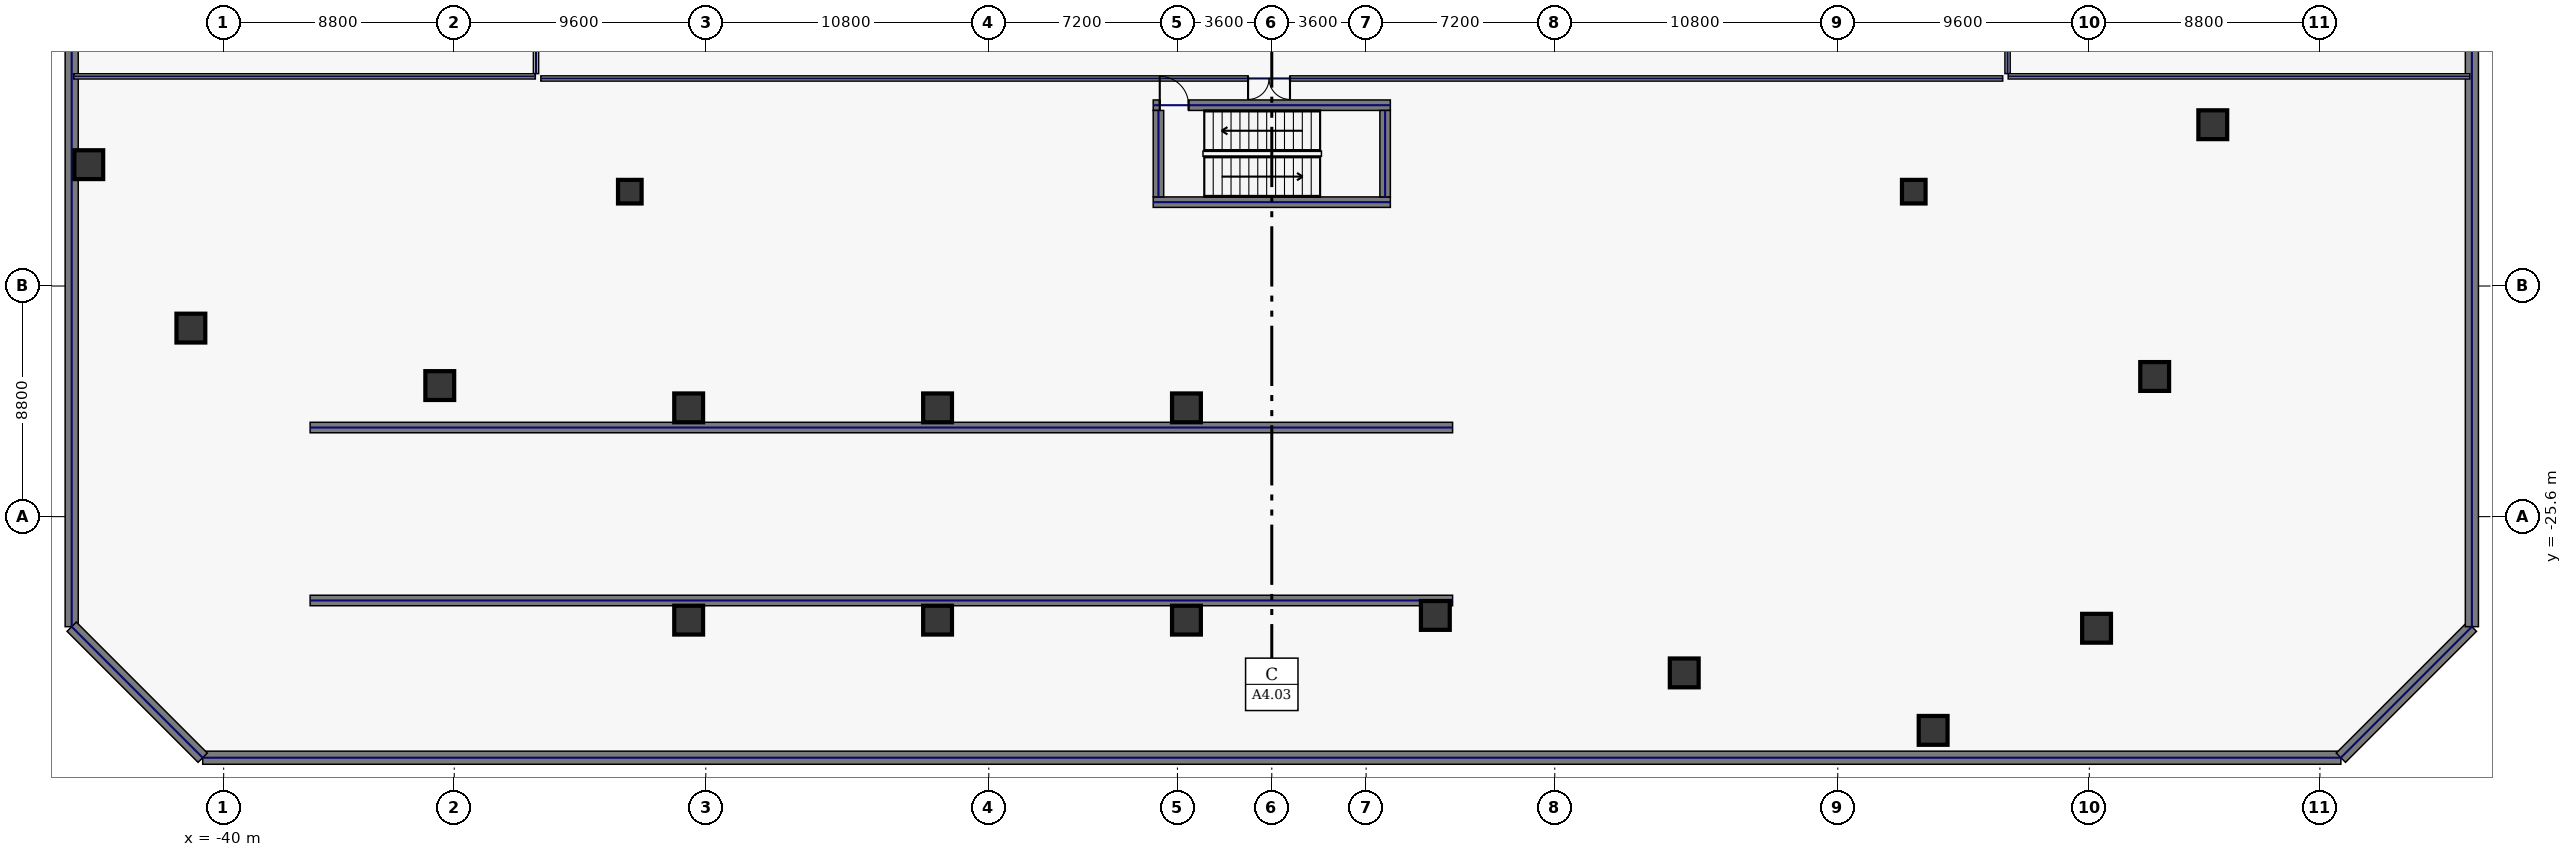
"""IFC4 building model, lengths in metres.
Left out: names, types, materials, properties, quantities, classifications, styles, units other than length and angle.
Written with IfcOpenShell. Run it as: python <this file> out.ifc"""

import sys

from ifc_helpers import new_model, si_unit, direction, frame, frame_2d, origin, origin_2d, place, context, subcontext, project, spatial, rectangle, extrude, element, fill, save


model = new_model("IFC4")
c1 = context("Model", 3, precision=1e-05, world=origin(), true_north=direction((0.0, 1.0)))
c2 = subcontext(c1, "Body", "Model", "MODEL_VIEW")
j1 = project(units=[si_unit("LENGTHUNIT", "METRE"), si_unit("PLANEANGLEUNIT", "RADIAN")], contexts=[c1])
p1 = place(None, origin())
s1 = spatial("IfcSite", under=j1, at=p1, CompositionType="ELEMENT")
p2 = place(p1, origin())
s2 = spatial("IfcBuilding", under=s1, at=p2, CompositionType="ELEMENT")
p3 = place(p2, frame((0.0, 0.0, -10.2)))
s3 = spatial("IfcBuildingStorey", under=s2, at=p3, CompositionType="ELEMENT", Elevation=-10.2)
p4 = place(p3, frame((-40.8, -34.8, 0.0), z_axis=(0.0, 0.0, 1.0), x_axis=(1.0, 0.0, 0.0)))
e1 = element("IfcWall", 1, at=p4, inside=s3, PredefinedType="SHEAR", context=c2, shape_type="SweptSolid", body=[
    extrude(rectangle(XDim=81.6, YDim=0.5, at=frame_2d((40.8, 0.0))), origin(), (0.0, 0.0, 1.0), 4.45),
])
p5 = place(p3, frame((40.8, -34.8, 0.0), z_axis=(0.0, 0.0, 1.0), x_axis=(0.707106781187, 0.707106781187, 0.0)))
e2 = element("IfcWall", 2, at=p5, inside=s3, PredefinedType="SHEAR", context=c2, shape_type="SweptSolid", body=[
    extrude(rectangle(XDim=7.071, YDim=0.5, at=frame_2d((3.536, 0.0))), origin(), (0.0, 0.0, 1.0), 4.45),
])
for number, where, z_axis, x_axis in (
    (3, (45.8, -29.8, 0.0), (0.0, 0.0, 1.0), (0.0, 1.0, 0.0)),
    (4, (-45.8, 26.4, 0.0), (0.0, 0.0, 1.0), (0.0, -1.0, 0.0)),
):
    element("IfcWall", number, at=place(p3, frame(where, z_axis=z_axis, x_axis=x_axis)), inside=s3, PredefinedType="SHEAR", context=c2, shape_type="SweptSolid", body=[
        extrude(rectangle(XDim=56.2, YDim=0.5, at=frame_2d((28.1, 0.0))), origin(), (0.0, 0.0, 1.0), 4.45),
    ])
p6 = place(p3, frame((-45.8, -29.8, 0.0), z_axis=(0.0, 0.0, 1.0), x_axis=(0.707106781187, -0.707106781187, 0.0)))
e5 = element("IfcWall", 5, at=p6, inside=s3, PredefinedType="SHEAR", context=c2, shape_type="SweptSolid", body=[
    extrude(rectangle(XDim=7.071, YDim=0.5, at=frame_2d((3.536, 0.0))), origin(), (0.0, 0.0, 1.0), 4.45),
])
for number, where, z_axis, x_axis in (
    (6, (-36.7, -28.8, 0.0), (0.0, 0.0, 1.0), (1.0, 0.0, 0.0)),
    (7, (-36.7, -22.2, 0.0), (0.0, 0.0, 1.0), (1.0, 0.0, 0.0)),
):
    element("IfcWall", number, at=place(p3, frame(where, z_axis=z_axis, x_axis=x_axis)), inside=s3, PredefinedType="SHEAR", context=c2, shape_type="SweptSolid", body=[
        extrude(rectangle(XDim=43.6, YDim=0.4, at=frame_2d((21.8, 0.0))), origin(), (0.0, 0.0, 1.0), 4.45),
    ])
p7 = place(p3, frame((-4.525, -13.6, 0.0), z_axis=(0.0, 0.0, 1.0), x_axis=(1.0, 0.0, 0.0)))
e8 = element("IfcWall", 8, at=p7, inside=s3, PredefinedType="SHEAR", context=c2, shape_type="SweptSolid", body=[
    extrude(rectangle(XDim=9.05, YDim=0.4, at=frame_2d((4.525, 0.0))), origin(), (0.0, 0.0, 1.0), 4.45),
])
p8 = place(p3, frame((-4.525, -9.9, 0.0), z_axis=(0.0, 0.0, 1.0), x_axis=(1.0, 0.0, 0.0)))
e9 = element("IfcWall", 9, at=p8, inside=s3, PredefinedType="SHEAR", context=c2, shape_type="SweptSolid", body=[
    extrude(rectangle(XDim=9.05, YDim=0.4, at=frame_2d((4.525, 0.0))), origin(), (0.0, 0.0, 1.0), 4.45),
])
p9 = place(p8, frame((0.25, 0.0, 0.0)))
e10 = element("IfcOpeningElement", 10, at=p9, cuts=e9, PredefinedType="OPENING", context=c2, shape_type="SweptSolid", body=[
    extrude(rectangle(XDim=1.1, YDim=2.2, at=frame_2d((0.55, 1.1))), frame((0.0, 0.21, 0.0), z_axis=(0.0, -1.0, 0.0), x_axis=(1.0, 0.0, 0.0)), (0.0, 0.0, 1.0), 0.42),
])
for number, where, z_axis, x_axis in (
    (11, (-4.325, -13.4, 0.0), (0.0, 0.0, 1.0), (0.0, 1.0, 0.0)),
    (12, (4.325, -13.4, 0.0), (0.0, 0.0, 1.0), (0.0, 1.0, 0.0)),
):
    element("IfcWall", number, at=place(p3, frame(where, z_axis=z_axis, x_axis=x_axis)), inside=s3, PredefinedType="SHEAR", context=c2, shape_type="SweptSolid", body=[
        extrude(rectangle(XDim=3.3, YDim=0.4, at=frame_2d((1.65, 0.0))), origin(), (0.0, 0.0, 1.0), 4.45),
    ])
for number, where, z_axis, x_axis in (
    (13, (-24.5, -13.2, 0.0), (0.0, 0.0, 1.0), (1.0, 0.0, 0.0)),
    (14, (24.5, -13.2, 0.0), (0.0, 0.0, 1.0), (1.0, 0.0, 0.0)),
):
    element("IfcColumn", number, at=place(p3, frame(where, z_axis=z_axis, x_axis=x_axis)), inside=s3, PredefinedType="COLUMN", context=c2, shape_type="SweptSolid", body=[
        extrude(rectangle(XDim=0.9, YDim=0.9, at=origin_2d()), origin(), (0.0, 0.0, 1.0), 4.45),
    ])
for number, where, z_axis, x_axis in (
    (15, (-41.251, -18.406, 0.0), (0.0, 0.0, 1.0), (1.0, 0.0, 0.0)),
    (16, (-31.752, -20.599, 0.0), (0.0, 0.0, 1.0), (1.0, 0.0, 0.0)),
    (17, (-22.254, -29.55, 0.0), (0.0, 0.0, 1.0), (1.0, 0.0, 0.0)),
    (18, (-22.254, -21.45, 0.0), (0.0, 0.0, 1.0), (1.0, 0.0, 0.0)),
    (19, (-12.755, -29.55, 0.0), (0.0, 0.0, 1.0), (1.0, 0.0, 0.0)),
    (20, (-12.755, -21.45, 0.0), (0.0, 0.0, 1.0), (1.0, 0.0, 0.0)),
    (21, (-3.256, -29.55, 0.0), (0.0, 0.0, 1.0), (1.0, 0.0, 0.0)),
    (22, (-3.256, -21.45, 0.0), (0.0, 0.0, 1.0), (1.0, 0.0, 0.0)),
    (23, (6.242, -29.371, 0.0), (0.0, 0.0, 1.0), (1.0, 0.0, 0.0)),
    (24, (15.741, -31.564, 0.0), (0.0, 0.0, 1.0), (1.0, 0.0, 0.0)),
    (25, (25.24, -33.757, 0.0), (0.0, 0.0, 1.0), (1.0, 0.0, 0.0)),
    (26, (31.476, -29.86, 0.0), (0.0, 0.0, 1.0), (1.0, 0.0, 0.0)),
    (27, (33.694, -20.252, 0.0), (0.0, 0.0, 1.0), (1.0, 0.0, 0.0)),
    (28, (35.912, -10.645, 0.0), (0.0, 0.0, 1.0), (1.0, 0.0, 0.0)),
    (29, (-45.148, -12.169, 0.0), (0.0, 0.0, 1.0), (1.0, 0.0, 0.0)),
):
    element("IfcColumn", number, at=place(p3, frame(where, z_axis=z_axis, x_axis=x_axis)), inside=s3, PredefinedType="COLUMN", context=c2, shape_type="SweptSolid", body=[
        extrude(rectangle(XDim=1.1, YDim=1.1, at=origin_2d()), origin(), (0.0, 0.0, 1.0), 4.45),
    ])
p10 = place(p3, frame((-28.08, -8.695, 0.0), z_axis=(0.0, 0.0, 1.0), x_axis=(0.0, 1.0, 0.0)))
e30 = element("IfcWall", 30, at=p10, inside=s3, PredefinedType="SOLIDWALL", context=c2, shape_type="SweptSolid", body=[
    extrude(rectangle(XDim=17.39, YDim=0.2, at=frame_2d((8.695, 0.0))), origin(), (0.0, 0.0, 1.0), 4.45),
])
p11 = place(p10, frame((10.4, 0.0, 0.0)))
e31 = element("IfcOpeningElement", 31, at=p11, cuts=e30, PredefinedType="OPENING", context=c2, shape_type="SweptSolid", body=[
    extrude(rectangle(XDim=1.6, YDim=2.3, at=frame_2d((0.8, 1.15))), frame((0.0, 0.11, 0.0), z_axis=(0.0, -1.0, 0.0), x_axis=(1.0, 0.0, 0.0)), (0.0, 0.0, 1.0), 0.22),
])
p12 = place(p3, frame((28.08, 8.695, 0.0), z_axis=(0.0, 0.0, 1.0), x_axis=(0.0, -1.0, 0.0)))
e32 = element("IfcWall", 32, at=p12, inside=s3, PredefinedType="SOLIDWALL", context=c2, shape_type="SweptSolid", body=[
    extrude(rectangle(XDim=17.39, YDim=0.2, at=frame_2d((8.695, 0.0))), origin(), (0.0, 0.0, 1.0), 4.45),
])
p13 = place(p12, frame((10.4, 0.0, 0.0)))
e33 = element("IfcOpeningElement", 33, at=p13, cuts=e32, PredefinedType="OPENING", context=c2, shape_type="SweptSolid", body=[
    extrude(rectangle(XDim=1.6, YDim=2.3, at=frame_2d((0.8, 1.15))), frame((0.0, 0.11, 0.0), z_axis=(0.0, -1.0, 0.0), x_axis=(1.0, 0.0, 0.0)), (0.0, 0.0, 1.0), 0.22),
])
p14 = place(p3, frame((27.895, -8.88, 0.0), z_axis=(0.0, 0.0, 1.0), x_axis=(-1.0, 0.0, 0.0)))
e34 = element("IfcWall", 34, at=p14, inside=s3, PredefinedType="SOLIDWALL", context=c2, shape_type="SweptSolid", body=[
    extrude(rectangle(XDim=55.79, YDim=0.2, at=frame_2d((27.895, 0.0))), origin(), (0.0, 0.0, 1.0), 4.45),
])
p15 = place(p14, frame((27.2, 0.0, 0.0)))
e35 = element("IfcOpeningElement", 35, at=p15, cuts=e34, PredefinedType="OPENING", context=c2, shape_type="SweptSolid", body=[
    extrude(rectangle(XDim=1.6, YDim=2.3, at=frame_2d((0.8, 1.15))), frame((0.0, 0.11, 0.0), z_axis=(0.0, -1.0, 0.0), x_axis=(1.0, 0.0, 0.0)), (0.0, 0.0, 1.0), 0.22),
])
for number, where, z_axis, x_axis in (
    (36, (-45.72, -8.8, 0.0), (0.0, 0.0, 1.0), (1.0, 0.0, 0.0)),
    (37, (28.105, -8.8, 0.0), (0.0, 0.0, 1.0), (1.0, 0.0, 0.0)),
):
    element("IfcWall", number, at=place(p3, frame(where, z_axis=z_axis, x_axis=x_axis)), inside=s3, PredefinedType="SOLIDWALL", context=c2, shape_type="SweptSolid", body=[
        extrude(rectangle(XDim=17.615, YDim=0.2, at=frame_2d((8.808, 0.0))), origin(), (0.0, 0.0, 1.0), 4.45),
    ])
p16 = place(p9, origin())
e38 = element("IfcDoor", 38, at=p16, inside=s3, OperationType="SINGLE_SWING_LEFT", PredefinedType="DOOR", context=c2, shape_type="SweptSolid", body=[
    extrude(rectangle(XDim=1.1, YDim=2.2, at=frame_2d((0.55, 1.1))), frame((0.0, 0.025, 0.0), z_axis=(0.0, -1.0, 0.0), x_axis=(1.0, 0.0, 0.0)), (0.0, 0.0, 1.0), 0.05),
])
fill(e10, e38)
p17 = place(p15, origin())
e39 = element("IfcDoor", 39, at=p17, inside=s3, OperationType="DOUBLE_SWING_LEFT", PredefinedType="DOOR", context=c2, shape_type="SweptSolid", body=[
    extrude(rectangle(XDim=1.6, YDim=2.3, at=frame_2d((0.8, 1.15))), frame((0.0, 0.025, 0.0), z_axis=(0.0, -1.0, 0.0), x_axis=(1.0, 0.0, 0.0)), (0.0, 0.0, 1.0), 0.05),
])
fill(e35, e39)
save(model, sys.argv[1])
